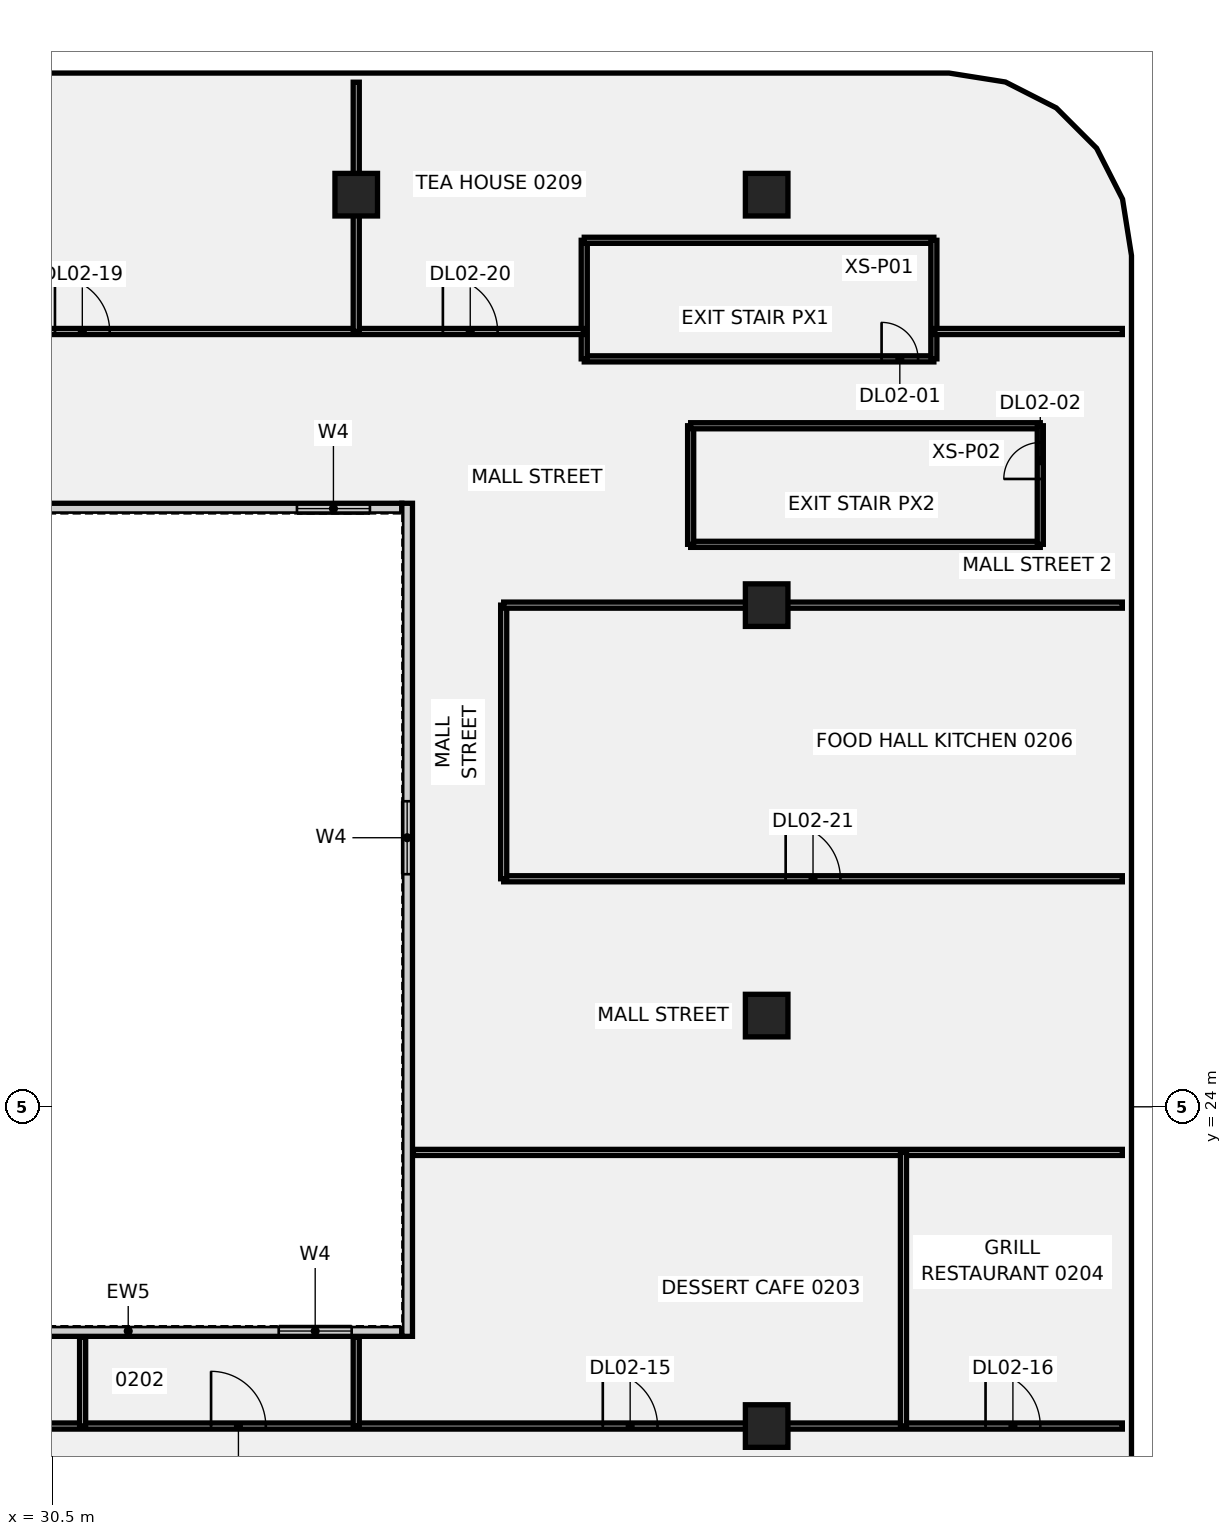
"""IFC4 building model, lengths in metres.
Left out: names, types, materials, properties, quantities, classifications, styles, units other than length and angle.
Written with IfcOpenShell. Run it as: python <this file> out.ifc"""

import sys

from ifc_helpers import new_model, si_unit, direction, frame, frame_2d, origin, origin_2d, place, context, subcontext, project, spatial, rectangle, extrude, element, fill, save


model = new_model("IFC4")
c1 = context("Model", 3, precision=1e-05, world=origin(), true_north=direction((0.0, 1.0)))
c2 = subcontext(c1, "Body", "Model", "MODEL_VIEW")
j1 = project(units=[si_unit("LENGTHUNIT", "METRE"), si_unit("PLANEANGLEUNIT", "RADIAN")], contexts=[c1])
p1 = place(None, origin())
s1 = spatial("IfcSite", under=j1, at=p1, CompositionType="ELEMENT")
p2 = place(p1, origin())
s2 = spatial("IfcBuilding", under=s1, at=p2, CompositionType="ELEMENT")
p3 = place(p2, frame((0.0, 0.0, 15.0)))
s3 = spatial("IfcBuildingStorey", under=s2, at=p3, CompositionType="ELEMENT", Elevation=15.0)
for number, where, z_axis, x_axis in (
    (1, (40.5, 54.0, -0.5), (0.0, 0.0, 1.0), (1.0, 0.0, 0.0)),
    (2, (54.0, 13.5, -0.5), (0.0, 0.0, 1.0), (1.0, 0.0, 0.0)),
    (3, (54.0, 27.0, -0.5), (0.0, 0.0, 1.0), (1.0, 0.0, 0.0)),
    (4, (54.0, 40.5, -0.5), (0.0, 0.0, 1.0), (1.0, 0.0, 0.0)),
    (5, (54.0, 54.0, -0.5), (0.0, 0.0, 1.0), (1.0, 0.0, 0.0)),
):
    element("IfcColumn", number, at=place(p3, frame(where, z_axis=z_axis, x_axis=x_axis)), inside=s3, PredefinedType="COLUMN", context=c2, shape_type="SweptSolid", body=[
        extrude(rectangle(XDim=1.4, YDim=1.4, at=origin_2d()), origin(), (0.0, 0.0, 1.0), 5.0),
    ])
p4 = place(p3, frame((48.0, 48.6, 0.0), z_axis=(0.0, 0.0, 1.0), x_axis=(1.0, 0.0, 0.0)))
e6 = element("IfcWall", 6, at=p4, inside=s3, PredefinedType="PARTITIONING", context=c2, shape_type="SweptSolid", body=[
    extrude(rectangle(XDim=11.5, YDim=0.2, at=frame_2d((5.75, 0.0))), origin(), (0.0, 0.0, 1.0), 4.5),
])
p5 = place(p4, frame((9.78, 0.0, 0.0)))
e7 = element("IfcOpeningElement", 7, at=p5, cuts=e6, PredefinedType="OPENING", context=c2, shape_type="SweptSolid", body=[
    extrude(rectangle(XDim=1.2, YDim=2.1, at=frame_2d((0.6, 1.05))), frame((0.0, 0.11, 0.0), z_axis=(0.0, -1.0, 0.0), x_axis=(1.0, 0.0, 0.0)), (0.0, 0.0, 1.0), 0.22),
])
p6 = place(p3, frame((48.0, 48.6, 0.0), z_axis=(0.0, 0.0, 1.0), x_axis=(0.0, 1.0, 0.0)))
e8 = element("IfcWall", 8, at=p6, inside=s3, PredefinedType="PARTITIONING", context=c2, shape_type="SweptSolid", body=[
    extrude(rectangle(XDim=3.9, YDim=0.2, at=frame_2d((1.95, 0.0))), origin(), (0.0, 0.0, 1.0), 4.5),
])
p7 = place(p3, frame((48.0, 52.5, 0.0), z_axis=(0.0, 0.0, 1.0), x_axis=(1.0, 0.0, 0.0)))
e9 = element("IfcWall", 9, at=p7, inside=s3, PredefinedType="PARTITIONING", context=c2, shape_type="SweptSolid", body=[
    extrude(rectangle(XDim=11.5, YDim=0.2, at=frame_2d((5.75, 0.0))), origin(), (0.0, 0.0, 1.0), 4.5),
])
p8 = place(p3, frame((59.5, 48.6, 0.0), z_axis=(0.0, 0.0, 1.0), x_axis=(0.0, 1.0, 0.0)))
e10 = element("IfcWall", 10, at=p8, inside=s3, PredefinedType="PARTITIONING", context=c2, shape_type="SweptSolid", body=[
    extrude(rectangle(XDim=3.9, YDim=0.2, at=frame_2d((1.95, 0.0))), origin(), (0.0, 0.0, 1.0), 4.5),
])
p9 = place(p3, frame((51.5, 42.5, 0.0), z_axis=(0.0, 0.0, 1.0), x_axis=(1.0, 0.0, 0.0)))
e11 = element("IfcWall", 11, at=p9, inside=s3, PredefinedType="PARTITIONING", context=c2, shape_type="SweptSolid", body=[
    extrude(rectangle(XDim=11.5, YDim=0.2, at=frame_2d((5.75, 0.0))), origin(), (0.0, 0.0, 1.0), 4.5),
])
p10 = place(p3, frame((51.5, 42.5, 0.0), z_axis=(0.0, 0.0, 1.0), x_axis=(0.0, 1.0, 0.0)))
e12 = element("IfcWall", 12, at=p10, inside=s3, PredefinedType="PARTITIONING", context=c2, shape_type="SweptSolid", body=[
    extrude(rectangle(XDim=3.9, YDim=0.2, at=frame_2d((1.95, 0.0))), origin(), (0.0, 0.0, 1.0), 4.5),
])
p11 = place(p3, frame((51.5, 46.4, 0.0), z_axis=(0.0, 0.0, 1.0), x_axis=(1.0, 0.0, 0.0)))
e13 = element("IfcWall", 13, at=p11, inside=s3, PredefinedType="PARTITIONING", context=c2, shape_type="SweptSolid", body=[
    extrude(rectangle(XDim=11.5, YDim=0.2, at=frame_2d((5.75, 0.0))), origin(), (0.0, 0.0, 1.0), 4.5),
])
p12 = place(p3, frame((63.0, 42.5, 0.0), z_axis=(0.0, 0.0, 1.0), x_axis=(0.0, 1.0, 0.0)))
e14 = element("IfcWall", 14, at=p12, inside=s3, PredefinedType="PARTITIONING", context=c2, shape_type="SweptSolid", body=[
    extrude(rectangle(XDim=3.9, YDim=0.2, at=frame_2d((1.95, 0.0))), origin(), (0.0, 0.0, 1.0), 4.5),
])
p13 = place(p12, frame((2.15, 0.0, 0.0)))
e15 = element("IfcOpeningElement", 15, at=p13, cuts=e14, PredefinedType="OPENING", context=c2, shape_type="SweptSolid", body=[
    extrude(rectangle(XDim=1.2, YDim=2.1, at=frame_2d((0.6, 1.05))), frame((0.0, 0.11, 0.0), z_axis=(0.0, -1.0, 0.0), x_axis=(1.0, 0.0, 0.0)), (0.0, 0.0, 1.0), 0.22),
])
p14 = place(p3, frame((19.53, 49.5, 0.0), z_axis=(0.0, 0.0, 1.0), x_axis=(1.0, 0.0, 0.0)))
e16 = element("IfcWall", 16, at=p14, inside=s3, PredefinedType="PARTITIONING", context=c2, shape_type="SweptSolid", body=[
    extrude(rectangle(XDim=28.44, YDim=0.2, at=frame_2d((14.22, 0.0))), origin(), (0.0, 0.0, 1.0), 4.5),
])
p15 = place(p14, frame((11.06, 0.0, 0.0)))
e17 = element("IfcOpeningElement", 17, at=p15, cuts=e16, PredefinedType="OPENING", context=c2, shape_type="SweptSolid", body=[
    extrude(rectangle(XDim=1.8, YDim=2.1, at=frame_2d((0.9, 1.05))), frame((0.0, 0.11, 0.0), z_axis=(0.0, -1.0, 0.0), x_axis=(1.0, 0.0, 0.0)), (0.0, 0.0, 1.0), 0.22),
])
p16 = place(p14, frame((23.82, 0.0, 0.0)))
e18 = element("IfcOpeningElement", 18, at=p16, cuts=e16, PredefinedType="OPENING", context=c2, shape_type="SweptSolid", body=[
    extrude(rectangle(XDim=1.8, YDim=2.1, at=frame_2d((0.9, 1.05))), frame((0.0, 0.11, 0.0), z_axis=(0.0, -1.0, 0.0), x_axis=(1.0, 0.0, 0.0)), (0.0, 0.0, 1.0), 0.22),
])
p17 = place(p3, frame((22.5, 13.5, 0.0), z_axis=(0.0, 0.0, 1.0), x_axis=(1.0, 0.0, 0.0)))
e19 = element("IfcWall", 19, at=p17, inside=s3, PredefinedType="PARTITIONING", context=c2, shape_type="SweptSolid", body=[
    extrude(rectangle(XDim=43.199, YDim=0.2, at=frame_2d((21.6, 0.0))), origin(), (0.0, 0.0, 1.0), 4.5),
])
p18 = place(p17, frame((2.714, 0.0, 0.0)))
e20 = element("IfcOpeningElement", 20, at=p18, cuts=e19, PredefinedType="OPENING", context=c2, shape_type="SweptSolid", body=[
    extrude(rectangle(XDim=1.8, YDim=2.1, at=frame_2d((0.9, 1.05))), frame((0.0, 0.11, 0.0), z_axis=(0.0, -1.0, 0.0), x_axis=(1.0, 0.0, 0.0)), (0.0, 0.0, 1.0), 0.22),
])
p19 = place(p17, frame((13.225, 0.0, 0.0)))
e21 = element("IfcOpeningElement", 21, at=p19, cuts=e19, PredefinedType="OPENING", context=c2, shape_type="SweptSolid", body=[
    extrude(rectangle(XDim=1.8, YDim=2.1, at=frame_2d((0.9, 1.05))), frame((0.0, 0.11, 0.0), z_axis=(0.0, -1.0, 0.0), x_axis=(1.0, 0.0, 0.0)), (0.0, 0.0, 1.0), 0.22),
])
p20 = place(p17, frame((26.11, 0.0, 0.0)))
e22 = element("IfcOpeningElement", 22, at=p20, cuts=e19, PredefinedType="OPENING", context=c2, shape_type="SweptSolid", body=[
    extrude(rectangle(XDim=1.8, YDim=2.1, at=frame_2d((0.9, 1.05))), frame((0.0, 0.11, 0.0), z_axis=(0.0, -1.0, 0.0), x_axis=(1.0, 0.0, 0.0)), (0.0, 0.0, 1.0), 0.22),
])
p21 = place(p17, frame((38.7, 0.0, 0.0)))
e23 = element("IfcOpeningElement", 23, at=p21, cuts=e19, PredefinedType="OPENING", context=c2, shape_type="SweptSolid", body=[
    extrude(rectangle(XDim=1.8, YDim=2.1, at=frame_2d((0.9, 1.05))), frame((0.0, 0.11, 0.0), z_axis=(0.0, -1.0, 0.0), x_axis=(1.0, 0.0, 0.0)), (0.0, 0.0, 1.0), 0.22),
])
for number, where, z_axis, x_axis in (
    (24, (31.5, 13.5, 0.0), (0.0, 0.0, 1.0), (0.0, 1.0, 0.0)),
    (25, (40.5, 13.5, 0.0), (0.0, 0.0, 1.0), (0.0, 1.0, 0.0)),
):
    element("IfcWall", number, at=place(p3, frame(where, z_axis=z_axis, x_axis=x_axis)), inside=s3, PredefinedType="PARTITIONING", context=c2, shape_type="SweptSolid", body=[
        extrude(rectangle(XDim=2.92, YDim=0.2, at=frame_2d((1.46, 0.0))), origin(), (0.0, 0.0, 1.0), 4.5),
    ])
p22 = place(p3, frame((40.5, 49.5, 0.0), z_axis=(0.0, 0.0, 1.0), x_axis=(0.0, 1.0, 0.0)))
e26 = element("IfcWall", 26, at=p22, inside=s3, PredefinedType="PARTITIONING", context=c2, shape_type="SweptSolid", body=[
    extrude(rectangle(XDim=8.199, YDim=0.2, at=frame_2d((4.1, 0.0))), origin(), (0.0, 0.0, 1.0), 4.5),
])
p23 = place(p3, frame((42.38, 22.5, 0.0), z_axis=(0.0, 0.0, 1.0), x_axis=(1.0, 0.0, 0.0)))
e27 = element("IfcWall", 27, at=p23, inside=s3, PredefinedType="PARTITIONING", context=c2, shape_type="SweptSolid", body=[
    extrude(rectangle(XDim=23.319, YDim=0.2, at=frame_2d((11.66, 0.0))), origin(), (0.0, 0.0, 1.0), 4.5),
])
p24 = place(p3, frame((58.5, 13.5, 0.0), z_axis=(0.0, 0.0, 1.0), x_axis=(0.0, 1.0, 0.0)))
e28 = element("IfcWall", 28, at=p24, inside=s3, PredefinedType="PARTITIONING", context=c2, shape_type="SweptSolid", body=[
    extrude(rectangle(XDim=9.0, YDim=0.2, at=frame_2d((4.5, 0.0))), origin(), (0.0, 0.0, 1.0), 4.5),
])
p25 = place(p3, frame((59.53, 49.5, 0.0), z_axis=(0.0, 0.0, 1.0), x_axis=(1.0, 0.0, 0.0)))
e29 = element("IfcWall", 29, at=p25, inside=s3, PredefinedType="PARTITIONING", context=c2, shape_type="SweptSolid", body=[
    extrude(rectangle(XDim=6.169, YDim=0.2, at=frame_2d((3.084, 0.0))), origin(), (0.0, 0.0, 1.0), 4.5),
])
p26 = place(p3, frame((45.35, 31.5, 0.0), z_axis=(0.0, 0.0, 1.0), x_axis=(1.0, 0.0, 0.0)))
e30 = element("IfcWall", 30, at=p26, inside=s3, PredefinedType="PARTITIONING", context=c2, shape_type="SweptSolid", body=[
    extrude(rectangle(XDim=20.349, YDim=0.2, at=frame_2d((10.174, 0.0))), origin(), (0.0, 0.0, 1.0), 4.5),
])
p27 = place(p26, frame((9.275, 0.0, 0.0)))
e31 = element("IfcOpeningElement", 31, at=p27, cuts=e30, PredefinedType="OPENING", context=c2, shape_type="SweptSolid", body=[
    extrude(rectangle(XDim=1.8, YDim=2.1, at=frame_2d((0.9, 1.05))), frame((0.0, 0.11, 0.0), z_axis=(0.0, -1.0, 0.0), x_axis=(1.0, 0.0, 0.0)), (0.0, 0.0, 1.0), 0.22),
])
p28 = place(p3, frame((45.35, 31.5, 0.0), z_axis=(0.0, 0.0, 1.0), x_axis=(0.0, 1.0, 0.0)))
e32 = element("IfcWall", 32, at=p28, inside=s3, PredefinedType="PARTITIONING", context=c2, shape_type="SweptSolid", body=[
    extrude(rectangle(XDim=9.0, YDim=0.2, at=frame_2d((4.5, 0.0))), origin(), (0.0, 0.0, 1.0), 4.5),
])
p29 = place(p3, frame((45.35, 40.5, 0.0), z_axis=(0.0, 0.0, 1.0), x_axis=(1.0, 0.0, 0.0)))
e33 = element("IfcWall", 33, at=p29, inside=s3, PredefinedType="PARTITIONING", context=c2, shape_type="SweptSolid", body=[
    extrude(rectangle(XDim=20.349, YDim=0.2, at=frame_2d((10.174, 0.0))), origin(), (0.0, 0.0, 1.0), 4.5),
])
p30 = place(p3, frame((24.0, 16.625, 0.0), z_axis=(0.0, 0.0, 1.0), x_axis=(1.0, 0.0, 0.0)))
e34 = element("IfcWall", 34, at=p30, inside=s3, PredefinedType="SOLIDWALL", context=c2, shape_type="SweptSolid", body=[
    extrude(rectangle(XDim=18.0, YDim=0.35, at=frame_2d((9.0, 0.0))), origin(), (0.0, 0.0, 1.0), 4.5),
])
p31 = place(p30, frame((13.95, 0.0, 1.0)))
e35 = element("IfcOpeningElement", 35, at=p31, cuts=e34, PredefinedType="OPENING", context=c2, shape_type="SweptSolid", body=[
    extrude(rectangle(XDim=2.4, YDim=1.8, at=frame_2d((1.2, 0.9))), frame((0.0, 0.185, 0.0), z_axis=(0.0, -1.0, 0.0), x_axis=(1.0, 0.0, 0.0)), (0.0, 0.0, 1.0), 0.37),
])
p32 = place(p3, frame((24.0, 43.675, 0.0), z_axis=(0.0, 0.0, 1.0), x_axis=(1.0, 0.0, 0.0)))
e36 = element("IfcWall", 36, at=p32, inside=s3, PredefinedType="SOLIDWALL", context=c2, shape_type="SweptSolid", body=[
    extrude(rectangle(XDim=18.0, YDim=0.35, at=frame_2d((9.0, 0.0))), origin(), (0.0, 0.0, 1.0), 4.5),
])
p33 = place(p32, frame((14.55, 0.0, 1.0)))
e37 = element("IfcOpeningElement", 37, at=p33, cuts=e36, PredefinedType="OPENING", context=c2, shape_type="SweptSolid", body=[
    extrude(rectangle(XDim=2.4, YDim=1.8, at=frame_2d((1.2, 0.9))), frame((0.0, 0.185, 0.0), z_axis=(0.0, -1.0, 0.0), x_axis=(1.0, 0.0, 0.0)), (0.0, 0.0, 1.0), 0.37),
])
p34 = place(p3, frame((42.175, 16.45, 0.0), z_axis=(0.0, 0.0, 1.0), x_axis=(0.0, 1.0, 0.0)))
e38 = element("IfcWall", 38, at=p34, inside=s3, PredefinedType="SOLIDWALL", context=c2, shape_type="SweptSolid", body=[
    extrude(rectangle(XDim=27.4, YDim=0.35, at=frame_2d((13.7, 0.0))), origin(), (0.0, 0.0, 1.0), 4.5),
])
p35 = place(p34, frame((15.2, 0.0, 1.0)))
e39 = element("IfcOpeningElement", 39, at=p35, cuts=e38, PredefinedType="OPENING", context=c2, shape_type="SweptSolid", body=[
    extrude(rectangle(XDim=2.4, YDim=1.8, at=frame_2d((1.2, 0.9))), frame((0.0, 0.185, 0.0), z_axis=(0.0, -1.0, 0.0), x_axis=(1.0, 0.0, 0.0)), (0.0, 0.0, 1.0), 0.37),
])
p36 = place(p5, origin())
e40 = element("IfcDoor", 40, at=p36, inside=s3, OperationType="SINGLE_SWING_LEFT", PredefinedType="DOOR", context=c2, shape_type="SweptSolid", body=[
    extrude(rectangle(XDim=1.2, YDim=2.1, at=frame_2d((0.6, 1.05))), frame((0.0, 0.025, 0.0), z_axis=(0.0, -1.0, 0.0), x_axis=(1.0, 0.0, 0.0)), (0.0, 0.0, 1.0), 0.05),
])
fill(e7, e40)
p37 = place(p13, origin())
e41 = element("IfcDoor", 41, at=p37, inside=s3, OperationType="SINGLE_SWING_RIGHT", PredefinedType="DOOR", context=c2, shape_type="SweptSolid", body=[
    extrude(rectangle(XDim=1.2, YDim=2.1, at=frame_2d((0.6, 1.05))), frame((0.0, 0.025, 0.0), z_axis=(0.0, -1.0, 0.0), x_axis=(1.0, 0.0, 0.0)), (0.0, 0.0, 1.0), 0.05),
])
fill(e15, e41)
p38 = place(p19, origin())
e42 = element("IfcDoor", 42, at=p38, inside=s3, OperationType="SINGLE_SWING_RIGHT", PredefinedType="DOOR", context=c2, shape_type="SweptSolid", body=[
    extrude(rectangle(XDim=1.8, YDim=2.1, at=frame_2d((0.9, 1.05))), frame((0.0, 0.025, 0.0), z_axis=(0.0, -1.0, 0.0), x_axis=(1.0, 0.0, 0.0)), (0.0, 0.0, 1.0), 0.05),
])
fill(e21, e42)
p39 = place(p20, origin())
e43 = element("IfcDoor", 43, at=p39, inside=s3, OperationType="SINGLE_SWING_LEFT", PredefinedType="DOOR", context=c2, shape_type="SweptSolid", body=[
    extrude(rectangle(XDim=1.8, YDim=2.1, at=frame_2d((0.9, 1.05))), frame((0.0, 0.025, 0.0), z_axis=(0.0, -1.0, 0.0), x_axis=(1.0, 0.0, 0.0)), (0.0, 0.0, 1.0), 0.05),
])
fill(e22, e43)
p40 = place(p21, origin())
e44 = element("IfcDoor", 44, at=p40, inside=s3, OperationType="SINGLE_SWING_RIGHT", PredefinedType="DOOR", context=c2, shape_type="SweptSolid", body=[
    extrude(rectangle(XDim=1.8, YDim=2.1, at=frame_2d((0.9, 1.05))), frame((0.0, 0.025, 0.0), z_axis=(0.0, -1.0, 0.0), x_axis=(1.0, 0.0, 0.0)), (0.0, 0.0, 1.0), 0.05),
])
fill(e23, e44)
p41 = place(p15, origin())
e45 = element("IfcDoor", 45, at=p41, inside=s3, OperationType="SINGLE_SWING_LEFT", PredefinedType="DOOR", context=c2, shape_type="SweptSolid", body=[
    extrude(rectangle(XDim=1.8, YDim=2.1, at=frame_2d((0.9, 1.05))), frame((0.0, 0.025, 0.0), z_axis=(0.0, -1.0, 0.0), x_axis=(1.0, 0.0, 0.0)), (0.0, 0.0, 1.0), 0.05),
])
fill(e17, e45)
p42 = place(p16, origin())
e46 = element("IfcDoor", 46, at=p42, inside=s3, OperationType="SINGLE_SWING_RIGHT", PredefinedType="DOOR", context=c2, shape_type="SweptSolid", body=[
    extrude(rectangle(XDim=1.8, YDim=2.1, at=frame_2d((0.9, 1.05))), frame((0.0, 0.025, 0.0), z_axis=(0.0, -1.0, 0.0), x_axis=(1.0, 0.0, 0.0)), (0.0, 0.0, 1.0), 0.05),
])
fill(e18, e46)
p43 = place(p27, origin())
e47 = element("IfcDoor", 47, at=p43, inside=s3, OperationType="SINGLE_SWING_LEFT", PredefinedType="DOOR", context=c2, shape_type="SweptSolid", body=[
    extrude(rectangle(XDim=1.8, YDim=2.1, at=frame_2d((0.9, 1.05))), frame((0.0, 0.025, 0.0), z_axis=(0.0, -1.0, 0.0), x_axis=(1.0, 0.0, 0.0)), (0.0, 0.0, 1.0), 0.05),
])
fill(e31, e47)
p44 = place(p31, origin())
e48 = element("IfcWindow", 48, at=p44, inside=s3, PartitioningType="SINGLE_PANEL", PredefinedType="WINDOW", context=c2, shape_type="SweptSolid", body=[
    extrude(rectangle(XDim=2.4, YDim=1.8, at=frame_2d((1.2, 0.9))), frame((0.0, 0.03, 0.0), z_axis=(0.0, -1.0, 0.0), x_axis=(1.0, 0.0, 0.0)), (0.0, 0.0, 1.0), 0.06),
])
fill(e35, e48)
p45 = place(p33, origin())
e49 = element("IfcWindow", 49, at=p45, inside=s3, PartitioningType="SINGLE_PANEL", PredefinedType="WINDOW", context=c2, shape_type="SweptSolid", body=[
    extrude(rectangle(XDim=2.4, YDim=1.8, at=frame_2d((1.2, 0.9))), frame((0.0, 0.03, 0.0), z_axis=(0.0, -1.0, 0.0), x_axis=(1.0, 0.0, 0.0)), (0.0, 0.0, 1.0), 0.06),
])
fill(e37, e49)
p46 = place(p35, origin())
e50 = element("IfcWindow", 50, at=p46, inside=s3, PartitioningType="SINGLE_PANEL", PredefinedType="WINDOW", context=c2, shape_type="SweptSolid", body=[
    extrude(rectangle(XDim=2.4, YDim=1.8, at=frame_2d((1.2, 0.9))), frame((0.0, 0.03, 0.0), z_axis=(0.0, -1.0, 0.0), x_axis=(1.0, 0.0, 0.0)), (0.0, 0.0, 1.0), 0.06),
])
fill(e39, e50)
save(model, sys.argv[1])
